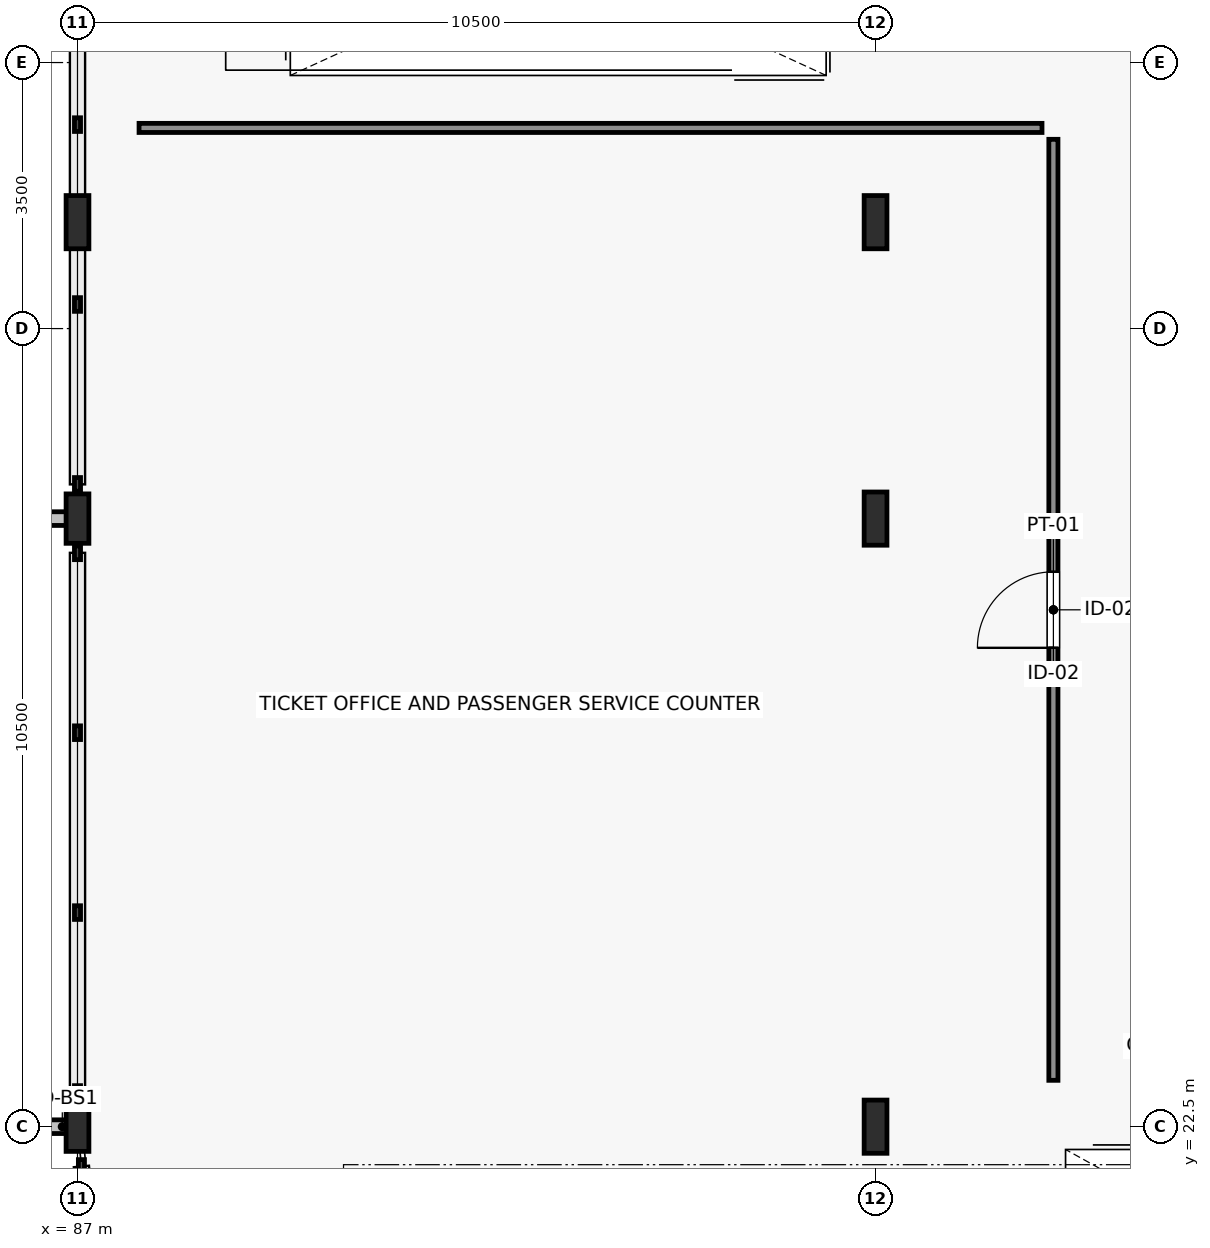
"""IFC4 building model, lengths in metres.
Left out: names, types, materials, properties, quantities, classifications, styles, units other than length and angle.
Written with IfcOpenShell. Run it as: python <this file> out.ifc"""

import sys

from ifc_helpers import new_model, si_unit, direction, frame, frame_2d, origin, origin_2d, place, context, subcontext, project, spatial, rectangle, i_section, extrude, element, fill, save


model = new_model("IFC4")
c1 = context("Model", 3, precision=1e-05, world=origin(), true_north=direction((0.0, 1.0)))
c2 = subcontext(c1, "Body", "Model", "MODEL_VIEW")
j1 = project(units=[si_unit("LENGTHUNIT", "METRE"), si_unit("PLANEANGLEUNIT", "RADIAN")], contexts=[c1])
p1 = place(None, origin())
s1 = spatial("IfcSite", under=j1, at=p1, CompositionType="ELEMENT")
p2 = place(p1, origin())
s2 = spatial("IfcBuilding", under=s1, at=p2, CompositionType="ELEMENT")
p3 = place(p2, frame((0.0, 0.0, 9.8)))
s3 = spatial("IfcBuildingStorey", under=s2, at=p3, CompositionType="ELEMENT", Elevation=9.8)
p4 = place(p3, frame((87.0, 22.5, 0.0), z_axis=(0.0, 0.0, 1.0), x_axis=(1.0, 0.0, 0.0)))
e1 = element("IfcColumn", 1, at=p4, inside=s3, PredefinedType="COLUMN", context=c2, shape_type="SweptSolid", body=[
    extrude(i_section(OverallWidth=0.3, OverallDepth=0.65, WebThickness=0.016, FlangeThickness=0.031, FilletRadius=0.027, at=origin_2d()), origin(), (0.0, 0.0, 1.0), 5.2),
])
p5 = place(p3, frame((97.5, 22.5, 0.0), z_axis=(0.0, 0.0, 1.0), x_axis=(1.0, 0.0, 0.0)))
e2 = element("IfcColumn", 2, at=p5, inside=s3, PredefinedType="COLUMN", context=c2, shape_type="SweptSolid", body=[
    extrude(i_section(OverallWidth=0.3, OverallDepth=0.7, WebThickness=0.017, FlangeThickness=0.032, FilletRadius=0.027, at=origin_2d()), origin(), (0.0, 0.0, 1.0), 5.0),
])
p6 = place(p3, frame((87.0, 30.5, 0.0), z_axis=(0.0, 0.0, 1.0), x_axis=(1.0, 0.0, 0.0)))
e3 = element("IfcColumn", 3, at=p6, inside=s3, PredefinedType="COLUMN", context=c2, shape_type="SweptSolid", body=[
    extrude(i_section(OverallWidth=0.3, OverallDepth=0.65, WebThickness=0.016, FlangeThickness=0.031, FilletRadius=0.027, at=origin_2d()), origin(), (0.0, 0.0, 1.0), 5.2),
])
p7 = place(p3, frame((97.5, 30.5, 0.0), z_axis=(0.0, 0.0, 1.0), x_axis=(1.0, 0.0, 0.0)))
e4 = element("IfcColumn", 4, at=p7, inside=s3, PredefinedType="COLUMN", context=c2, shape_type="SweptSolid", body=[
    extrude(i_section(OverallWidth=0.3, OverallDepth=0.7, WebThickness=0.017, FlangeThickness=0.032, FilletRadius=0.027, at=origin_2d()), origin(), (0.0, 0.0, 1.0), 5.0),
])
for number, where, z_axis, x_axis in (
    (5, (87.0, 34.4, 0.0), (0.0, 0.0, 1.0), (1.0, 0.0, 0.0)),
    (6, (97.5, 34.4, 0.0), (0.0, 0.0, 1.0), (1.0, 0.0, 0.0)),
):
    element("IfcColumn", number, at=place(p3, frame(where, z_axis=z_axis, x_axis=x_axis)), inside=s3, PredefinedType="COLUMN", context=c2, shape_type="SweptSolid", body=[
        extrude(i_section(OverallWidth=0.3, OverallDepth=0.7, WebThickness=0.017, FlangeThickness=0.032, FilletRadius=0.027, at=origin_2d()), origin(), (0.0, 0.0, 1.0), 4.995),
    ])
p8 = place(p3, frame((99.84, 23.11, 0.0), z_axis=(0.0, 0.0, 1.0), x_axis=(0.0, 1.0, 0.0)))
e7 = element("IfcWall", 7, at=p8, inside=s3, PredefinedType="PARTITIONING", context=c2, shape_type="SweptSolid", body=[
    extrude(rectangle(XDim=12.38, YDim=0.12, at=frame_2d((6.19, 0.0))), origin(), (0.0, 0.0, 1.0), 4.575),
])
p9 = place(p8, frame((5.69, 0.0, 0.0)))
e8 = element("IfcOpeningElement", 8, at=p9, cuts=e7, PredefinedType="OPENING", context=c2, shape_type="SweptSolid", body=[
    extrude(rectangle(XDim=1.0, YDim=2.15, at=frame_2d((0.5, 1.075))), frame((0.0, 0.07, 0.0), z_axis=(0.0, -1.0, 0.0), x_axis=(1.0, 0.0, 0.0)), (0.0, 0.0, 1.0), 0.14),
])
p10 = place(p3, frame((87.81, 35.64, 0.0), z_axis=(0.0, 0.0, 1.0), x_axis=(1.0, 0.0, 0.0)))
e9 = element("IfcWall", 9, at=p10, inside=s3, PredefinedType="PARTITIONING", context=c2, shape_type="SweptSolid", body=[
    extrude(rectangle(XDim=11.88, YDim=0.12, at=frame_2d((5.94, 0.0))), origin(), (0.0, 0.0, 1.0), 4.95),
])
p11 = place(p9, origin())
e10 = element("IfcDoor", 10, at=p11, inside=s3, OperationType="SINGLE_SWING_LEFT", PredefinedType="DOOR", context=c2, shape_type="SweptSolid", body=[
    extrude(rectangle(XDim=1.0, YDim=2.15, at=frame_2d((0.5, 1.075))), frame((0.0, 0.025, 0.0), z_axis=(0.0, -1.0, 0.0), x_axis=(1.0, 0.0, 0.0)), (0.0, 0.0, 1.0), 0.05),
])
fill(e8, e10)
save(model, sys.argv[1])
